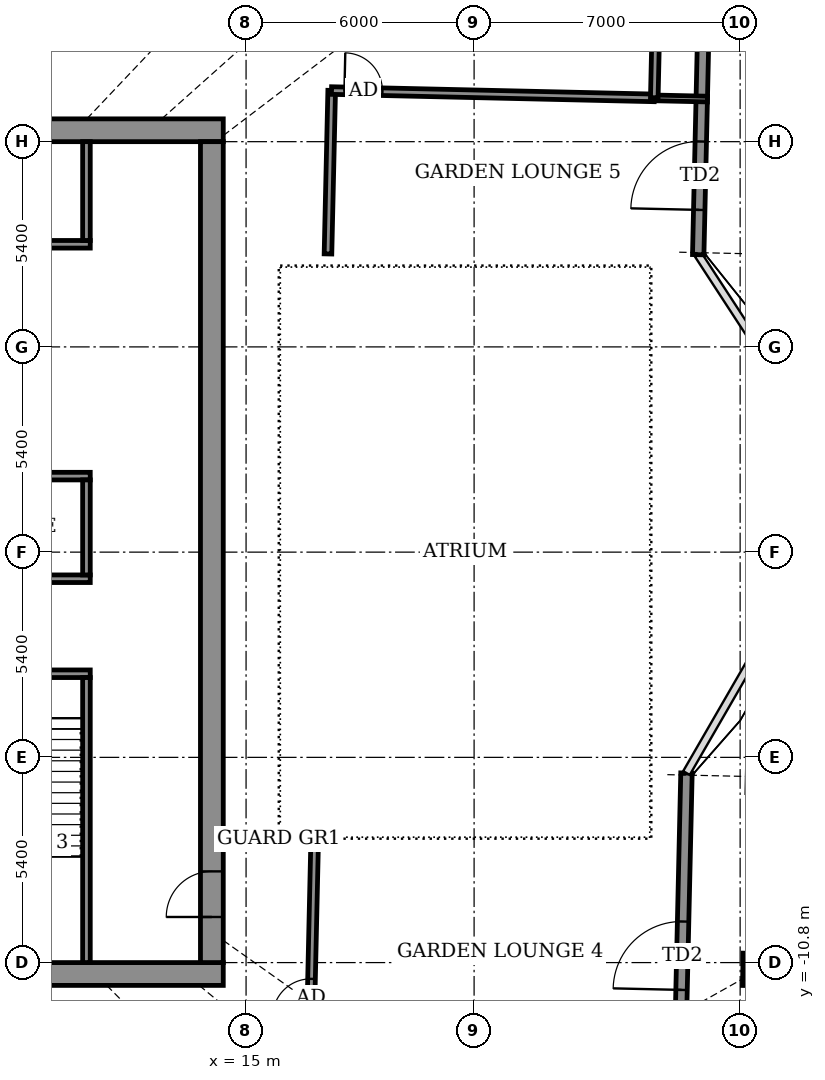
"""IFC4 building model, lengths in metres.
Left out: names, types, materials, properties, quantities, classifications, styles, units other than length and angle.
Written with IfcOpenShell. Run it as: python <this file> out.ifc"""

import sys

from ifc_helpers import new_model, si_unit, direction, frame, frame_2d, origin, origin_2d, place, context, subcontext, project, spatial, rectangle, extrude, element, fill, save


model = new_model("IFC4")
c1 = context("Model", 3, precision=1e-05, world=origin(), true_north=direction((0.0, 1.0)))
c2 = subcontext(c1, "Body", "Model", "MODEL_VIEW")
j1 = project(units=[si_unit("LENGTHUNIT", "METRE"), si_unit("PLANEANGLEUNIT", "RADIAN")], contexts=[c1])
p1 = place(None, origin())
s1 = spatial("IfcSite", under=j1, at=p1, CompositionType="ELEMENT")
p2 = place(p1, origin())
s2 = spatial("IfcBuilding", under=s1, at=p2, CompositionType="ELEMENT")
p3 = place(p2, frame((0.0, 0.0, 329.7)))
s3 = spatial("IfcBuildingStorey", under=s2, at=p3, CompositionType="ELEMENT", Elevation=329.7)
p4 = place(p3, frame((28.496, -10.986, -0.55), z_axis=(0.0, 0.0, 1.0), x_axis=(0.022660985877, 0.999743206888, 0.0)))
e1 = element("IfcColumn", 1, at=p4, inside=s3, PredefinedType="COLUMN", context=c2, shape_type="SweptSolid", body=[
    extrude(rectangle(XDim=0.85, YDim=0.85, at=origin_2d()), origin(), (0.0, 0.0, 1.0), 4.6),
])
p5 = place(p3, frame((26.298, -18.588, 0.0), z_axis=(0.0, 0.0, 1.0), x_axis=(0.022677140298, 0.999742840588, 0.0)))
e2 = element("IfcWall", 2, at=p5, inside=s3, PredefinedType="SOLIDWALL", context=c2, shape_type="SweptSolid", body=[
    extrude(rectangle(XDim=12.779, YDim=0.3, at=frame_2d((6.39, 0.0))), origin(), (0.0, 0.0, 1.0), 2.35),
])
p6 = place(p5, frame((1.75, 0.0, 0.0)))
e3 = element("IfcOpeningElement", 3, at=p6, cuts=e2, PredefinedType="OPENING", context=c2, shape_type="SweptSolid", body=[
    extrude(rectangle(XDim=1.8, YDim=2.0, at=frame_2d((0.9, 1.0))), frame((0.0, 0.16, 0.0), z_axis=(0.0, -1.0, 0.0), x_axis=(1.0, 0.0, 0.0)), (0.0, 0.0, 1.0), 0.32),
])
p7 = place(p5, frame((7.071, 0.0, 0.0)))
e4 = element("IfcOpeningElement", 4, at=p7, cuts=e2, PredefinedType="OPENING", context=c2, shape_type="SweptSolid", body=[
    extrude(rectangle(XDim=1.8, YDim=2.0, at=frame_2d((0.9, 1.0))), frame((0.0, 0.16, 0.0), z_axis=(0.0, -1.0, 0.0), x_axis=(1.0, 0.0, 0.0)), (0.0, 0.0, 1.0), 0.32),
])
p8 = place(p3, frame((26.897, 7.826, 0.0), z_axis=(0.0, 0.0, 1.0), x_axis=(0.022695801562, 0.999742417121, 0.0)))
e5 = element("IfcWall", 5, at=p8, inside=s3, PredefinedType="SOLIDWALL", context=c2, shape_type="SweptSolid", body=[
    extrude(rectangle(XDim=12.779, YDim=0.3, at=frame_2d((6.39, 0.0))), origin(), (0.0, 0.0, 1.0), 2.25),
])
p9 = place(p8, frame((1.179, 0.0, 0.0)))
e6 = element("IfcOpeningElement", 6, at=p9, cuts=e5, PredefinedType="OPENING", context=c2, shape_type="SweptSolid", body=[
    extrude(rectangle(XDim=1.8, YDim=2.0, at=frame_2d((0.9, 1.0))), frame((0.0, 0.16, 0.0), z_axis=(0.0, -1.0, 0.0), x_axis=(1.0, 0.0, 0.0)), (0.0, 0.0, 1.0), 0.32),
])
p10 = place(p8, frame((8.366, 0.0, 0.0)))
e7 = element("IfcOpeningElement", 7, at=p10, cuts=e5, PredefinedType="OPENING", context=c2, shape_type="SweptSolid", body=[
    extrude(rectangle(XDim=1.8, YDim=2.0, at=frame_2d((0.9, 1.0))), frame((0.0, 0.16, 0.0), z_axis=(0.0, -1.0, 0.0), x_axis=(1.0, 0.0, 0.0)), (0.0, 0.0, 1.0), 0.32),
])
p11 = place(p3, frame((28.613, -6.275, 0.0), z_axis=(0.0, 0.0, 1.0), x_axis=(-0.022685579062, -0.999742649137, 0.0)))
e8 = element("IfcWall", 8, at=p11, inside=s3, PredefinedType="USERDEFINED", context=c2, shape_type="SweptSolid", body=[
    extrude(rectangle(XDim=13.312, YDim=0.55, at=frame_2d((6.656, 0.0))), origin(), (0.0, 0.0, 1.0), 0.8),
])
p12 = place(p3, frame((16.684, -12.919, 0.0), z_axis=(0.0, 0.0, 1.0), x_axis=(0.022667483124, 0.999743059595, 0.0)))
e9 = element("IfcWall", 9, at=p12, inside=s3, PredefinedType="PARTITIONING", context=c2, shape_type="SweptSolid", body=[
    extrude(rectangle(XDim=5.245, YDim=0.2, at=frame_2d((2.623, 0.0))), origin(), (0.0, 0.0, 1.0), 2.35),
])
p13 = place(p12, frame((0.691, 0.0, 0.0)))
e10 = element("IfcOpeningElement", 10, at=p13, cuts=e9, PredefinedType="OPENING", context=c2, shape_type="SweptSolid", body=[
    extrude(rectangle(XDim=1.0, YDim=2.1, at=frame_2d((0.5, 1.05))), frame((0.0, 0.11, 0.0), z_axis=(0.0, -1.0, 0.0), x_axis=(1.0, 0.0, 0.0)), (0.0, 0.0, 1.0), 0.22),
])
p14 = place(p3, frame((17.155, 7.846, 0.0), z_axis=(0.0, 0.0, 1.0), x_axis=(0.022745886685, 0.999741278851, 0.0)))
e11 = element("IfcWall", 11, at=p14, inside=s3, PredefinedType="PARTITIONING", context=c2, shape_type="SweptSolid", body=[
    extrude(rectangle(XDim=4.304, YDim=0.2, at=frame_2d((2.152, 0.0))), origin(), (0.0, 0.0, 1.0), 4.05),
])
p15 = place(p3, frame((17.248, 12.145, 0.0), z_axis=(0.0, 0.0, 1.0), x_axis=(0.999741583257, -0.022732503302, 0.0)))
e12 = element("IfcWall", 12, at=p15, inside=s3, PredefinedType="PARTITIONING", context=c2, shape_type="SweptSolid", body=[
    extrude(rectangle(XDim=8.495, YDim=0.2, at=frame_2d((4.248, 0.0))), origin(), (0.0, 0.0, 1.0), 4.05),
])
p16 = place(p15, frame((0.34, 0.0, 0.0)))
e13 = element("IfcOpeningElement", 13, at=p16, cuts=e12, PredefinedType="OPENING", context=c2, shape_type="SweptSolid", body=[
    extrude(rectangle(XDim=1.0, YDim=2.1, at=frame_2d((0.5, 1.05))), frame((0.0, 0.11, 0.0), z_axis=(0.0, -1.0, 0.0), x_axis=(1.0, 0.0, 0.0)), (0.0, 0.0, 1.0), 0.22),
])
p17 = place(p3, frame((25.741, 11.952, 0.0), z_axis=(0.0, 0.0, 1.0), x_axis=(0.999754467928, -0.022158606881, 0.0)))
e14 = element("IfcWall", 14, at=p17, inside=s3, PredefinedType="PARTITIONING", context=c2, shape_type="SweptSolid", body=[
    extrude(rectangle(XDim=1.399, YDim=0.15, at=frame_2d((0.7, 0.0))), origin(), (0.0, 0.0, 1.0), 4.05),
])
p18 = place(p3, frame((25.741, 11.956, 0.0), z_axis=(0.0, 0.0, 1.0), x_axis=(0.022617910375, 0.999744182344, 0.0)))
e15 = element("IfcWall", 15, at=p18, inside=s3, PredefinedType="PARTITIONING", context=c2, shape_type="SweptSolid", body=[
    extrude(rectangle(XDim=1.5, YDim=0.2, at=frame_2d((0.75, 0.0))), origin(), (0.0, 0.0, 1.0), 4.05),
])
for number, where, z_axis, x_axis in (
    (16, (-14.4, -11.1, 0.0), (0.0, 0.0, 1.0), (1.0, 0.0, 0.0)),
    (17, (-14.4, 11.1, 0.0), (0.0, 0.0, 1.0), (1.0, 0.0, 0.0)),
):
    element("IfcWall", number, at=place(p3, frame(where, z_axis=z_axis, x_axis=x_axis)), inside=s3, PredefinedType="SHEAR", context=c2, shape_type="SweptSolid", body=[
        extrude(rectangle(XDim=28.8, YDim=0.6, at=frame_2d((14.4, 0.0))), origin(), (0.0, 0.0, 1.0), 4.6),
    ])
p19 = place(p3, frame((14.1, -10.8, 0.0), z_axis=(0.0, 0.0, 1.0), x_axis=(0.0, 1.0, 0.0)))
e18 = element("IfcWall", 18, at=p19, inside=s3, PredefinedType="SHEAR", context=c2, shape_type="SweptSolid", body=[
    extrude(rectangle(XDim=21.6, YDim=0.6, at=frame_2d((10.8, 0.0))), origin(), (0.0, 0.0, 1.0), 4.6),
])
p20 = place(p19, frame((1.2, 0.0, 0.0)))
e19 = element("IfcOpeningElement", 19, at=p20, cuts=e18, PredefinedType="OPENING", context=c2, shape_type="SweptSolid", body=[
    extrude(rectangle(XDim=1.2, YDim=2.1, at=frame_2d((0.6, 1.05))), frame((0.0, 0.31, 0.0), z_axis=(0.0, -1.0, 0.0), x_axis=(1.0, 0.0, 0.0)), (0.0, 0.0, 1.0), 0.62),
])
p21 = place(p3, frame((-10.9, -3.2, 0.0), z_axis=(0.0, 0.0, 1.0), x_axis=(1.0, 0.0, 0.0)))
e20 = element("IfcWall", 20, at=p21, inside=s3, PredefinedType="SHEAR", context=c2, shape_type="SweptSolid", body=[
    extrude(rectangle(XDim=21.8, YDim=0.2, at=frame_2d((10.9, 0.0))), origin(), (0.0, 0.0, 1.0), 4.05),
])
p22 = place(p21, frame((1.075, 0.0, 0.0)))
e21 = element("IfcOpeningElement", 21, at=p22, cuts=e20, PredefinedType="OPENING", context=c2, shape_type="SweptSolid", body=[
    extrude(rectangle(XDim=1.1, YDim=2.1, at=frame_2d((0.55, 1.05))), frame((0.0, 0.11, 0.0), z_axis=(0.0, -1.0, 0.0), x_axis=(1.0, 0.0, 0.0)), (0.0, 0.0, 1.0), 0.22),
])
p23 = place(p21, frame((10.325, 0.0, 0.0)))
e22 = element("IfcOpeningElement", 22, at=p23, cuts=e20, PredefinedType="OPENING", context=c2, shape_type="SweptSolid", body=[
    extrude(rectangle(XDim=1.1, YDim=2.1, at=frame_2d((0.55, 1.05))), frame((0.0, 0.11, 0.0), z_axis=(0.0, -1.0, 0.0), x_axis=(1.0, 0.0, 0.0)), (0.0, 0.0, 1.0), 0.22),
])
p24 = place(p21, frame((19.625, 0.0, 0.0)))
e23 = element("IfcOpeningElement", 23, at=p24, cuts=e20, PredefinedType="OPENING", context=c2, shape_type="SweptSolid", body=[
    extrude(rectangle(XDim=1.1, YDim=2.1, at=frame_2d((0.55, 1.05))), frame((0.0, 0.11, 0.0), z_axis=(0.0, -1.0, 0.0), x_axis=(1.0, 0.0, 0.0)), (0.0, 0.0, 1.0), 0.22),
])
p25 = place(p21, frame((5.7, 0.0, 0.0)))
e24 = element("IfcOpeningElement", 24, at=p25, cuts=e20, PredefinedType="OPENING", context=c2, shape_type="SweptSolid", body=[
    extrude(rectangle(XDim=1.1, YDim=2.1, at=frame_2d((0.55, 1.05))), frame((0.0, 0.11, 0.0), z_axis=(0.0, -1.0, 0.0), x_axis=(1.0, 0.0, 0.0)), (0.0, 0.0, 1.0), 0.22),
])
p26 = place(p21, frame((14.975, 0.0, 0.0)))
e25 = element("IfcOpeningElement", 25, at=p26, cuts=e20, PredefinedType="OPENING", context=c2, shape_type="SweptSolid", body=[
    extrude(rectangle(XDim=1.1, YDim=2.1, at=frame_2d((0.55, 1.05))), frame((0.0, 0.11, 0.0), z_axis=(0.0, -1.0, 0.0), x_axis=(1.0, 0.0, 0.0)), (0.0, 0.0, 1.0), 0.22),
])
p27 = place(p3, frame((-10.9, -0.7, 0.0), z_axis=(0.0, 0.0, 1.0), x_axis=(1.0, 0.0, 0.0)))
e26 = element("IfcWall", 26, at=p27, inside=s3, PredefinedType="SHEAR", context=c2, shape_type="SweptSolid", body=[
    extrude(rectangle(XDim=21.8, YDim=0.2, at=frame_2d((10.9, 0.0))), origin(), (0.0, 0.0, 1.0), 4.05),
])
p28 = place(p3, frame((-10.9, 2.0, 0.0), z_axis=(0.0, 0.0, 1.0), x_axis=(1.0, 0.0, 0.0)))
e27 = element("IfcWall", 27, at=p28, inside=s3, PredefinedType="SHEAR", context=c2, shape_type="SweptSolid", body=[
    extrude(rectangle(XDim=21.8, YDim=0.2, at=frame_2d((10.9, 0.0))), origin(), (0.0, 0.0, 1.0), 4.05),
])
p29 = place(p28, frame((4.95, 0.0, 0.0)))
e28 = element("IfcOpeningElement", 28, at=p29, cuts=e27, PredefinedType="OPENING", context=c2, shape_type="SweptSolid", body=[
    extrude(rectangle(XDim=1.1, YDim=2.1, at=frame_2d((0.55, 1.05))), frame((0.0, 0.11, 0.0), z_axis=(0.0, -1.0, 0.0), x_axis=(1.0, 0.0, 0.0)), (0.0, 0.0, 1.0), 0.22),
])
p30 = place(p28, frame((7.65, 0.0, 0.0)))
e29 = element("IfcOpeningElement", 29, at=p30, cuts=e27, PredefinedType="OPENING", context=c2, shape_type="SweptSolid", body=[
    extrude(rectangle(XDim=1.1, YDim=2.1, at=frame_2d((0.55, 1.05))), frame((0.0, 0.11, 0.0), z_axis=(0.0, -1.0, 0.0), x_axis=(1.0, 0.0, 0.0)), (0.0, 0.0, 1.0), 0.22),
])
p31 = place(p28, frame((10.35, 0.0, 0.0)))
e30 = element("IfcOpeningElement", 30, at=p31, cuts=e27, PredefinedType="OPENING", context=c2, shape_type="SweptSolid", body=[
    extrude(rectangle(XDim=1.1, YDim=2.1, at=frame_2d((0.55, 1.05))), frame((0.0, 0.11, 0.0), z_axis=(0.0, -1.0, 0.0), x_axis=(1.0, 0.0, 0.0)), (0.0, 0.0, 1.0), 0.22),
])
p32 = place(p28, frame((1.675, 0.0, 0.0)))
e31 = element("IfcOpeningElement", 31, at=p32, cuts=e27, PredefinedType="OPENING", context=c2, shape_type="SweptSolid", body=[
    extrude(rectangle(XDim=0.9, YDim=2.1, at=frame_2d((0.45, 1.05))), frame((0.0, 0.11, 0.0), z_axis=(0.0, -1.0, 0.0), x_axis=(1.0, 0.0, 0.0)), (0.0, 0.0, 1.0), 0.22),
])
p33 = place(p28, frame((13.825, 0.0, 0.0)))
e32 = element("IfcOpeningElement", 32, at=p33, cuts=e27, PredefinedType="OPENING", context=c2, shape_type="SweptSolid", body=[
    extrude(rectangle(XDim=0.9, YDim=2.1, at=frame_2d((0.45, 1.05))), frame((0.0, 0.11, 0.0), z_axis=(0.0, -1.0, 0.0), x_axis=(1.0, 0.0, 0.0)), (0.0, 0.0, 1.0), 0.22),
])
p34 = place(p28, frame((18.55, 0.0, 0.0)))
e33 = element("IfcOpeningElement", 33, at=p34, cuts=e27, PredefinedType="OPENING", context=c2, shape_type="SweptSolid", body=[
    extrude(rectangle(XDim=0.9, YDim=2.1, at=frame_2d((0.45, 1.05))), frame((0.0, 0.11, 0.0), z_axis=(0.0, -1.0, 0.0), x_axis=(1.0, 0.0, 0.0)), (0.0, 0.0, 1.0), 0.22),
])
p35 = place(p3, frame((-10.9, 8.1, 0.0), z_axis=(0.0, 0.0, 1.0), x_axis=(1.0, 0.0, 0.0)))
e34 = element("IfcWall", 34, at=p35, inside=s3, PredefinedType="SHEAR", context=c2, shape_type="SweptSolid", body=[
    extrude(rectangle(XDim=21.8, YDim=0.2, at=frame_2d((10.9, 0.0))), origin(), (0.0, 0.0, 1.0), 4.05),
])
p36 = place(p35, frame((4.95, 0.0, 0.0)))
e35 = element("IfcOpeningElement", 35, at=p36, cuts=e34, PredefinedType="OPENING", context=c2, shape_type="SweptSolid", body=[
    extrude(rectangle(XDim=1.1, YDim=2.1, at=frame_2d((0.55, 1.05))), frame((0.0, 0.11, 0.0), z_axis=(0.0, -1.0, 0.0), x_axis=(1.0, 0.0, 0.0)), (0.0, 0.0, 1.0), 0.22),
])
p37 = place(p35, frame((7.65, 0.0, 0.0)))
e36 = element("IfcOpeningElement", 36, at=p37, cuts=e34, PredefinedType="OPENING", context=c2, shape_type="SweptSolid", body=[
    extrude(rectangle(XDim=1.1, YDim=2.1, at=frame_2d((0.55, 1.05))), frame((0.0, 0.11, 0.0), z_axis=(0.0, -1.0, 0.0), x_axis=(1.0, 0.0, 0.0)), (0.0, 0.0, 1.0), 0.22),
])
p38 = place(p35, frame((10.35, 0.0, 0.0)))
e37 = element("IfcOpeningElement", 37, at=p38, cuts=e34, PredefinedType="OPENING", context=c2, shape_type="SweptSolid", body=[
    extrude(rectangle(XDim=1.1, YDim=2.1, at=frame_2d((0.55, 1.05))), frame((0.0, 0.11, 0.0), z_axis=(0.0, -1.0, 0.0), x_axis=(1.0, 0.0, 0.0)), (0.0, 0.0, 1.0), 0.22),
])
p39 = place(p35, frame((1.675, 0.0, 0.0)))
e38 = element("IfcOpeningElement", 38, at=p39, cuts=e34, PredefinedType="OPENING", context=c2, shape_type="SweptSolid", body=[
    extrude(rectangle(XDim=0.9, YDim=2.1, at=frame_2d((0.45, 1.05))), frame((0.0, 0.11, 0.0), z_axis=(0.0, -1.0, 0.0), x_axis=(1.0, 0.0, 0.0)), (0.0, 0.0, 1.0), 0.22),
])
p40 = place(p35, frame((13.825, 0.0, 0.0)))
e39 = element("IfcOpeningElement", 39, at=p40, cuts=e34, PredefinedType="OPENING", context=c2, shape_type="SweptSolid", body=[
    extrude(rectangle(XDim=0.9, YDim=2.1, at=frame_2d((0.45, 1.05))), frame((0.0, 0.11, 0.0), z_axis=(0.0, -1.0, 0.0), x_axis=(1.0, 0.0, 0.0)), (0.0, 0.0, 1.0), 0.22),
])
p41 = place(p35, frame((18.55, 0.0, 0.0)))
e40 = element("IfcOpeningElement", 40, at=p41, cuts=e34, PredefinedType="OPENING", context=c2, shape_type="SweptSolid", body=[
    extrude(rectangle(XDim=0.9, YDim=2.1, at=frame_2d((0.45, 1.05))), frame((0.0, 0.11, 0.0), z_axis=(0.0, -1.0, 0.0), x_axis=(1.0, 0.0, 0.0)), (0.0, 0.0, 1.0), 0.22),
])
p42 = place(p3, frame((10.8, -10.8, 0.0), z_axis=(0.0, 0.0, 1.0), x_axis=(0.0, 1.0, 0.0)))
e41 = element("IfcWall", 41, at=p42, inside=s3, PredefinedType="SHEAR", context=c2, shape_type="SweptSolid", body=[
    extrude(rectangle(XDim=7.5, YDim=0.2, at=frame_2d((3.75, 0.0))), origin(), (0.0, 0.0, 1.0), 4.05),
])
p43 = place(p3, frame((10.8, -0.6, 0.0), z_axis=(0.0, 0.0, 1.0), x_axis=(0.0, 1.0, 0.0)))
e42 = element("IfcWall", 42, at=p43, inside=s3, PredefinedType="STANDARD", context=c2, shape_type="SweptSolid", body=[
    extrude(rectangle(XDim=2.5, YDim=0.2, at=frame_2d((1.25, 0.0))), origin(), (0.0, 0.0, 1.0), 4.05),
])
p44 = place(p3, frame((10.8, 8.2, 0.0), z_axis=(0.0, 0.0, 1.0), x_axis=(0.0, 1.0, 0.0)))
e43 = element("IfcWall", 43, at=p44, inside=s3, PredefinedType="STANDARD", context=c2, shape_type="SweptSolid", body=[
    extrude(rectangle(XDim=2.6, YDim=0.2, at=frame_2d((1.3, 0.0))), origin(), (0.0, 0.0, 1.0), 4.05),
])
p45 = place(p7, origin())
e44 = element("IfcDoor", 44, at=p45, inside=s3, OperationType="DOUBLE_DOOR_SINGLE_SWING", PredefinedType="DOOR", context=c2, shape_type="SweptSolid", body=[
    extrude(rectangle(XDim=1.8, YDim=2.0, at=frame_2d((0.9, 1.0))), frame((0.0, 0.025, 0.0), z_axis=(0.0, -1.0, 0.0), x_axis=(1.0, 0.0, 0.0)), (0.0, 0.0, 1.0), 0.05),
])
fill(e4, e44)
p46 = place(p9, origin())
e45 = element("IfcDoor", 45, at=p46, inside=s3, OperationType="DOUBLE_DOOR_SINGLE_SWING", PredefinedType="DOOR", context=c2, shape_type="SweptSolid", body=[
    extrude(rectangle(XDim=1.8, YDim=2.0, at=frame_2d((0.9, 1.0))), frame((0.0, 0.025, 0.0), z_axis=(0.0, -1.0, 0.0), x_axis=(1.0, 0.0, 0.0)), (0.0, 0.0, 1.0), 0.05),
])
fill(e6, e45)
p47 = place(p13, origin())
e46 = element("IfcDoor", 46, at=p47, inside=s3, OperationType="SINGLE_SWING_RIGHT", PredefinedType="DOOR", context=c2, shape_type="SweptSolid", body=[
    extrude(rectangle(XDim=1.0, YDim=2.1, at=frame_2d((0.5, 1.05))), frame((0.0, 0.025, 0.0), z_axis=(0.0, -1.0, 0.0), x_axis=(1.0, 0.0, 0.0)), (0.0, 0.0, 1.0), 0.05),
])
fill(e10, e46)
p48 = place(p16, origin())
e47 = element("IfcDoor", 47, at=p48, inside=s3, OperationType="SINGLE_SWING_LEFT", PredefinedType="DOOR", context=c2, shape_type="SweptSolid", body=[
    extrude(rectangle(XDim=1.0, YDim=2.1, at=frame_2d((0.5, 1.05))), frame((0.0, 0.025, 0.0), z_axis=(0.0, -1.0, 0.0), x_axis=(1.0, 0.0, 0.0)), (0.0, 0.0, 1.0), 0.05),
])
fill(e13, e47)
p49 = place(p20, origin())
e48 = element("IfcDoor", 48, at=p49, inside=s3, OperationType="DOUBLE_DOOR_SINGLE_SWING", PredefinedType="DOOR", context=c2, shape_type="SweptSolid", body=[
    extrude(rectangle(XDim=1.2, YDim=2.1, at=frame_2d((0.6, 1.05))), frame((0.0, 0.025, 0.0), z_axis=(0.0, -1.0, 0.0), x_axis=(1.0, 0.0, 0.0)), (0.0, 0.0, 1.0), 0.05),
])
fill(e19, e48)
save(model, sys.argv[1])
